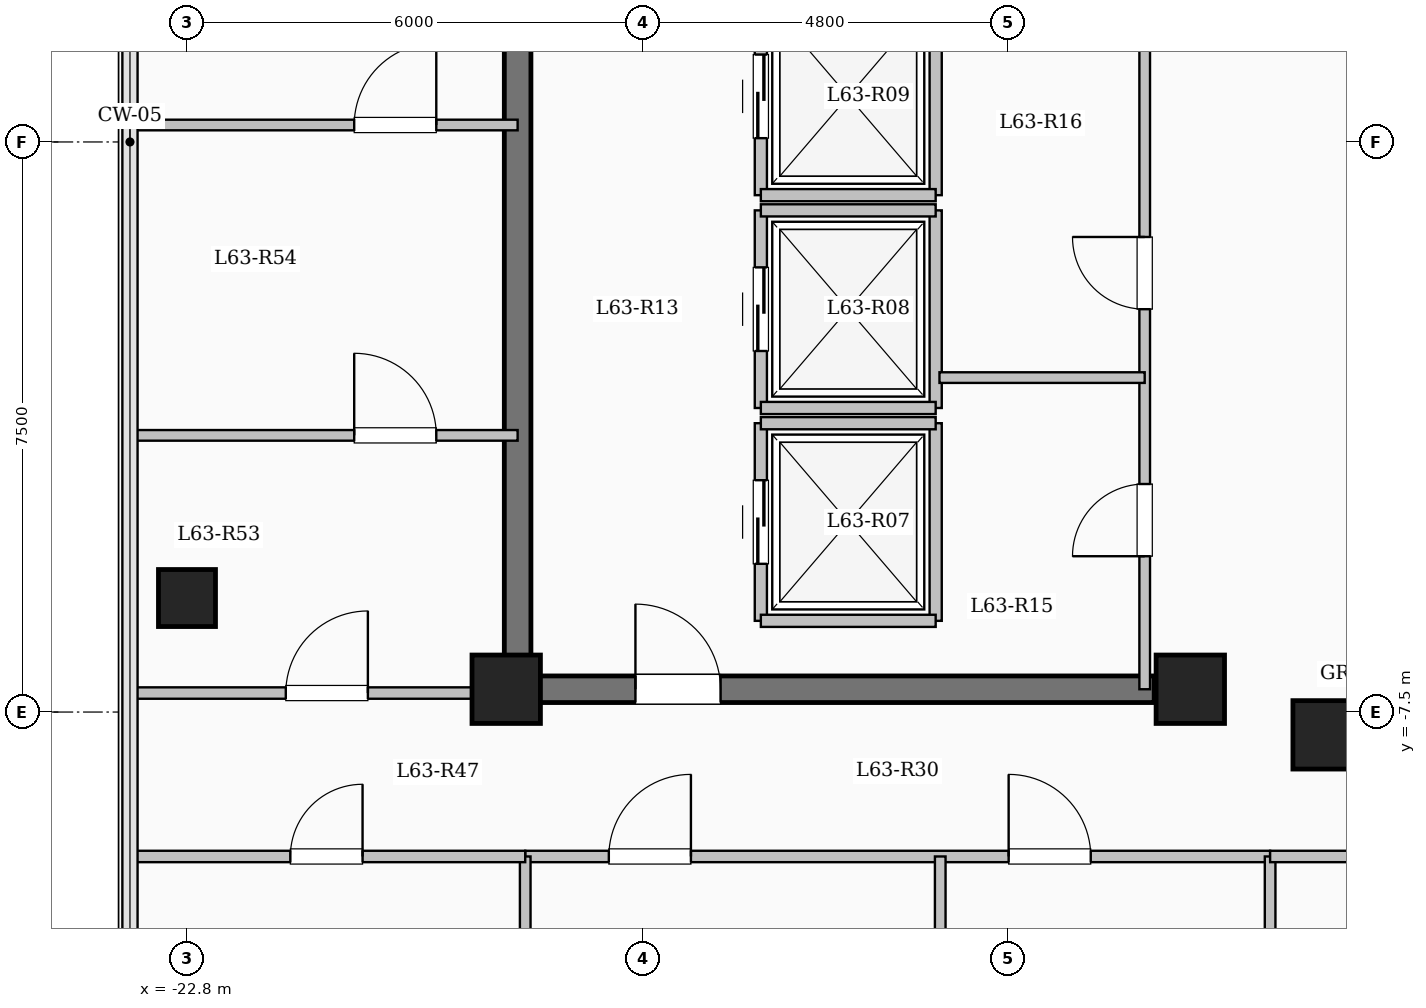
"""IFC4 building model, lengths in metres.
Left out: names, types, materials, properties, quantities, classifications, styles, units other than length and angle.
Written with IfcOpenShell. Run it as: python <this file> out.ifc"""

import sys

from ifc_helpers import new_model, si_unit, direction, frame, frame_2d, origin, origin_2d, place, context, subcontext, project, spatial, rectangle, extrude, element, fill, save


model = new_model("IFC4")
c1 = context("Model", 3, precision=1e-05, world=origin(), true_north=direction((0.0, 1.0)))
c2 = subcontext(c1, "Body", "Model", "MODEL_VIEW")
j1 = project(units=[si_unit("LENGTHUNIT", "METRE"), si_unit("PLANEANGLEUNIT", "RADIAN")], contexts=[c1])
p1 = place(None, origin())
s1 = spatial("IfcSite", under=j1, at=p1, CompositionType="ELEMENT")
p2 = place(p1, origin())
s2 = spatial("IfcBuilding", under=s1, at=p2, CompositionType="ELEMENT")
p3 = place(p2, frame((0.0, 0.0, 231.75)))
s3 = spatial("IfcBuildingStorey", under=s2, at=p3, CompositionType="ELEMENT", Elevation=231.75)
for number, where, z_axis, x_axis in (
    (1, (-7.8, -7.8, 0.0), (0.0, 0.0, 1.0), (1.0, 0.0, 0.0)),
    (2, (-9.6, -7.2, 0.0), (0.0, 0.0, 1.0), (1.0, 0.0, 0.0)),
    (3, (-18.6, -7.2, 0.0), (0.0, 0.0, 1.0), (1.0, 0.0, 0.0)),
):
    element("IfcColumn", number, at=place(p3, frame(where, z_axis=z_axis, x_axis=x_axis)), inside=s3, PredefinedType="COLUMN", context=c2, shape_type="SweptSolid", body=[
        extrude(rectangle(XDim=0.9, YDim=0.9, at=origin_2d()), origin(), (0.0, 0.0, 1.0), 4.65),
    ])
p4 = place(p3, frame((-22.8, -6.0, 0.0), z_axis=(0.0, 0.0, 1.0), x_axis=(1.0, 0.0, 0.0)))
e4 = element("IfcColumn", 4, at=p4, inside=s3, PredefinedType="COLUMN", context=c2, shape_type="SweptSolid", body=[
    extrude(rectangle(XDim=0.75, YDim=0.75, at=origin_2d()), origin(), (0.0, 0.0, 1.0), 4.65),
])
p5 = place(p3, frame((-15.25, -6.3, 0.0), z_axis=(0.0, 0.0, 1.0), x_axis=(0.0, 1.0, 0.0)))
e5 = element("IfcWall", 5, at=p5, inside=s3, PredefinedType="SOLIDWALL", context=c2, shape_type="SweptSolid", body=[
    extrude(rectangle(XDim=2.6, YDim=0.16, at=frame_2d((1.3, 0.0))), origin(), (0.0, 0.0, 1.0), 4.35),
])
p6 = place(p5, frame((0.75, 0.0, 0.0)))
e6 = element("IfcOpeningElement", 6, at=p6, cuts=e5, PredefinedType="OPENING", context=c2, shape_type="SweptSolid", body=[
    extrude(rectangle(XDim=1.1, YDim=2.15, at=frame_2d((0.55, 1.075))), frame((0.0, 0.09, 0.0), z_axis=(0.0, -1.0, 0.0), x_axis=(1.0, 0.0, 0.0)), (0.0, 0.0, 1.0), 0.18),
])
p7 = place(p3, frame((-12.95, -6.3, 0.0), z_axis=(0.0, 0.0, 1.0), x_axis=(0.0, 1.0, 0.0)))
e7 = element("IfcWall", 7, at=p7, inside=s3, PredefinedType="SOLIDWALL", context=c2, shape_type="SweptSolid", body=[
    extrude(rectangle(XDim=2.6, YDim=0.16, at=frame_2d((1.3, 0.0))), origin(), (0.0, 0.0, 1.0), 4.35),
])
for number, where, z_axis, x_axis in (
    (8, (-15.25, -6.3, 0.0), (0.0, 0.0, 1.0), (1.0, 0.0, 0.0)),
    (9, (-15.25, -3.7, 0.0), (0.0, 0.0, 1.0), (1.0, 0.0, 0.0)),
):
    element("IfcWall", number, at=place(p3, frame(where, z_axis=z_axis, x_axis=x_axis)), inside=s3, PredefinedType="SOLIDWALL", context=c2, shape_type="SweptSolid", body=[
        extrude(rectangle(XDim=2.3, YDim=0.16, at=frame_2d((1.15, 0.0))), origin(), (0.0, 0.0, 1.0), 4.35),
    ])
p8 = place(p3, frame((-15.25, -3.5, 0.0), z_axis=(0.0, 0.0, 1.0), x_axis=(0.0, 1.0, 0.0)))
e10 = element("IfcWall", 10, at=p8, inside=s3, PredefinedType="SOLIDWALL", context=c2, shape_type="SweptSolid", body=[
    extrude(rectangle(XDim=2.6, YDim=0.16, at=frame_2d((1.3, 0.0))), origin(), (0.0, 0.0, 1.0), 4.35),
])
p9 = place(p8, frame((0.75, 0.0, 0.0)))
e11 = element("IfcOpeningElement", 11, at=p9, cuts=e10, PredefinedType="OPENING", context=c2, shape_type="SweptSolid", body=[
    extrude(rectangle(XDim=1.1, YDim=2.15, at=frame_2d((0.55, 1.075))), frame((0.0, 0.09, 0.0), z_axis=(0.0, -1.0, 0.0), x_axis=(1.0, 0.0, 0.0)), (0.0, 0.0, 1.0), 0.18),
])
p10 = place(p3, frame((-12.95, -3.5, 0.0), z_axis=(0.0, 0.0, 1.0), x_axis=(0.0, 1.0, 0.0)))
e12 = element("IfcWall", 12, at=p10, inside=s3, PredefinedType="SOLIDWALL", context=c2, shape_type="SweptSolid", body=[
    extrude(rectangle(XDim=2.6, YDim=0.16, at=frame_2d((1.3, 0.0))), origin(), (0.0, 0.0, 1.0), 4.35),
])
for number, where, z_axis, x_axis in (
    (13, (-15.25, -3.5, 0.0), (0.0, 0.0, 1.0), (1.0, 0.0, 0.0)),
    (14, (-15.25, -0.9, 0.0), (0.0, 0.0, 1.0), (1.0, 0.0, 0.0)),
):
    element("IfcWall", number, at=place(p3, frame(where, z_axis=z_axis, x_axis=x_axis)), inside=s3, PredefinedType="SOLIDWALL", context=c2, shape_type="SweptSolid", body=[
        extrude(rectangle(XDim=2.3, YDim=0.16, at=frame_2d((1.15, 0.0))), origin(), (0.0, 0.0, 1.0), 4.35),
    ])
p11 = place(p3, frame((-15.25, -0.7, 0.0), z_axis=(0.0, 0.0, 1.0), x_axis=(0.0, 1.0, 0.0)))
e15 = element("IfcWall", 15, at=p11, inside=s3, PredefinedType="SOLIDWALL", context=c2, shape_type="SweptSolid", body=[
    extrude(rectangle(XDim=2.6, YDim=0.16, at=frame_2d((1.3, 0.0))), origin(), (0.0, 0.0, 1.0), 4.35),
])
p12 = place(p11, frame((0.75, 0.0, 0.0)))
e16 = element("IfcOpeningElement", 16, at=p12, cuts=e15, PredefinedType="OPENING", context=c2, shape_type="SweptSolid", body=[
    extrude(rectangle(XDim=1.1, YDim=2.15, at=frame_2d((0.55, 1.075))), frame((0.0, 0.09, 0.0), z_axis=(0.0, -1.0, 0.0), x_axis=(1.0, 0.0, 0.0)), (0.0, 0.0, 1.0), 0.18),
])
p13 = place(p3, frame((-12.95, -0.7, 0.0), z_axis=(0.0, 0.0, 1.0), x_axis=(0.0, 1.0, 0.0)))
e17 = element("IfcWall", 17, at=p13, inside=s3, PredefinedType="SOLIDWALL", context=c2, shape_type="SweptSolid", body=[
    extrude(rectangle(XDim=2.6, YDim=0.16, at=frame_2d((1.3, 0.0))), origin(), (0.0, 0.0, 1.0), 4.35),
])
p14 = place(p3, frame((-15.25, -0.7, 0.0), z_axis=(0.0, 0.0, 1.0), x_axis=(1.0, 0.0, 0.0)))
e18 = element("IfcWall", 18, at=p14, inside=s3, PredefinedType="SOLIDWALL", context=c2, shape_type="SweptSolid", body=[
    extrude(rectangle(XDim=2.3, YDim=0.16, at=frame_2d((1.15, 0.0))), origin(), (0.0, 0.0, 1.0), 4.35),
])
p15 = place(p3, frame((-18.45, -7.375, 0.0), z_axis=(0.0, 0.0, 1.0), x_axis=(0.0, 1.0, 0.0)))
e19 = element("IfcWall", 19, at=p15, inside=s3, PredefinedType="SHEAR", context=c2, shape_type="SweptSolid", body=[
    extrude(rectangle(XDim=14.05, YDim=0.35, at=frame_2d((7.025, 0.0))), origin(), (0.0, 0.0, 1.0), 4.65),
])
p16 = place(p3, frame((-18.625, -7.2, 0.0), z_axis=(0.0, 0.0, 1.0), x_axis=(1.0, 0.0, 0.0)))
e20 = element("IfcWall", 20, at=p16, inside=s3, PredefinedType="SHEAR", context=c2, shape_type="SweptSolid", body=[
    extrude(rectangle(XDim=8.55, YDim=0.35, at=frame_2d((4.275, 0.0))), origin(), (0.0, 0.0, 1.0), 4.65),
])
p17 = place(p16, frame((1.725, 0.0, 0.0)))
e21 = element("IfcOpeningElement", 21, at=p17, cuts=e20, PredefinedType="OPENING", context=c2, shape_type="SweptSolid", body=[
    extrude(rectangle(XDim=1.12, YDim=2.15, at=frame_2d((0.56, 1.075))), frame((0.0, 0.185, 0.0), z_axis=(0.0, -1.0, 0.0), x_axis=(1.0, 0.0, 0.0)), (0.0, 0.0, 1.0), 0.37),
])
p18 = place(p3, frame((-10.2, -7.2, 0.0), z_axis=(0.0, 0.0, 1.0), x_axis=(0.0, 1.0, 0.0)))
e22 = element("IfcWall", 22, at=p18, inside=s3, PredefinedType="PARTITIONING", context=c2, shape_type="SweptSolid", body=[
    extrude(rectangle(XDim=9.12, YDim=0.14, at=frame_2d((4.56, 0.0))), origin(), (0.0, 0.0, 1.0), 4.35),
])
p19 = place(p18, frame((1.75, 0.0, 0.0)))
e23 = element("IfcOpeningElement", 23, at=p19, cuts=e22, PredefinedType="OPENING", context=c2, shape_type="SweptSolid", body=[
    extrude(rectangle(XDim=0.95, YDim=2.12, at=frame_2d((0.475, 1.06))), frame((0.0, 0.08, 0.0), z_axis=(0.0, -1.0, 0.0), x_axis=(1.0, 0.0, 0.0)), (0.0, 0.0, 1.0), 0.16),
])
p20 = place(p18, frame((5.0, 0.0, 0.0)))
e24 = element("IfcOpeningElement", 24, at=p20, cuts=e22, PredefinedType="OPENING", context=c2, shape_type="SweptSolid", body=[
    extrude(rectangle(XDim=0.95, YDim=2.12, at=frame_2d((0.475, 1.06))), frame((0.0, 0.08, 0.0), z_axis=(0.0, -1.0, 0.0), x_axis=(1.0, 0.0, 0.0)), (0.0, 0.0, 1.0), 0.16),
])
p21 = place(p3, frame((-12.9, -3.1, 0.0), z_axis=(0.0, 0.0, 1.0), x_axis=(1.0, 0.0, 0.0)))
e25 = element("IfcWall", 25, at=p21, inside=s3, PredefinedType="PARTITIONING", context=c2, shape_type="SweptSolid", body=[
    extrude(rectangle(XDim=2.7, YDim=0.14, at=frame_2d((1.35, 0.0))), origin(), (0.0, 0.0, 1.0), 4.35),
])
p22 = place(p3, frame((-18.35, -9.4, 0.0), z_axis=(0.0, 0.0, 1.0), x_axis=(1.0, 0.0, 0.0)))
e26 = element("IfcWall", 26, at=p22, inside=s3, PredefinedType="PARTITIONING", context=c2, shape_type="SweptSolid", body=[
    extrude(rectangle(XDim=9.8, YDim=0.15, at=frame_2d((4.9, 0.0))), origin(), (0.0, 0.0, 1.0), 4.35),
])
p23 = place(p22, frame((1.1, 0.0, 0.0)))
e27 = element("IfcOpeningElement", 27, at=p23, cuts=e26, PredefinedType="OPENING", context=c2, shape_type="SweptSolid", body=[
    extrude(rectangle(XDim=1.08, YDim=2.15, at=frame_2d((0.54, 1.075))), frame((0.0, 0.085, 0.0), z_axis=(0.0, -1.0, 0.0), x_axis=(1.0, 0.0, 0.0)), (0.0, 0.0, 1.0), 0.17),
])
p24 = place(p22, frame((6.36, 0.0, 0.0)))
e28 = element("IfcOpeningElement", 28, at=p24, cuts=e26, PredefinedType="OPENING", context=c2, shape_type="SweptSolid", body=[
    extrude(rectangle(XDim=1.08, YDim=2.15, at=frame_2d((0.54, 1.075))), frame((0.0, 0.085, 0.0), z_axis=(0.0, -1.0, 0.0), x_axis=(1.0, 0.0, 0.0)), (0.0, 0.0, 1.0), 0.17),
])
p25 = place(p3, frame((-12.89, -20.9, 0.0), z_axis=(0.0, 0.0, 1.0), x_axis=(0.0, 1.0, 0.0)))
e29 = element("IfcWall", 29, at=p25, inside=s3, PredefinedType="PARTITIONING", context=c2, shape_type="SweptSolid", body=[
    extrude(rectangle(XDim=11.5, YDim=0.14, at=frame_2d((5.75, 0.0))), origin(), (0.0, 0.0, 1.0), 4.35),
])
p26 = place(p3, frame((-8.55, -21.504, 0.0), z_axis=(0.0, 0.0, 1.0), x_axis=(0.0, 1.0, 0.0)))
e30 = element("IfcWall", 30, at=p26, inside=s3, PredefinedType="PARTITIONING", context=c2, shape_type="SweptSolid", body=[
    extrude(rectangle(XDim=12.104, YDim=0.14, at=frame_2d((6.052, 0.0))), origin(), (0.0, 0.0, 1.0), 4.35),
])
p27 = place(p3, frame((-8.55, -9.4, 0.0), z_axis=(0.0, 0.0, 1.0), x_axis=(1.0, 0.0, 0.0)))
e31 = element("IfcWall", 31, at=p27, inside=s3, PredefinedType="PARTITIONING", context=c2, shape_type="SweptSolid", body=[
    extrude(rectangle(XDim=17.1, YDim=0.15, at=frame_2d((8.55, 0.0))), origin(), (0.0, 0.0, 1.0), 4.35),
])
p28 = place(p27, frame((1.85, 0.0, 0.0)))
e32 = element("IfcOpeningElement", 32, at=p28, cuts=e31, PredefinedType="OPENING", context=c2, shape_type="SweptSolid", body=[
    extrude(rectangle(XDim=1.08, YDim=2.15, at=frame_2d((0.54, 1.075))), frame((0.0, 0.085, 0.0), z_axis=(0.0, -1.0, 0.0), x_axis=(1.0, 0.0, 0.0)), (0.0, 0.0, 1.0), 0.17),
])
p29 = place(p27, frame((10.5, 0.0, 0.0)))
e33 = element("IfcOpeningElement", 33, at=p29, cuts=e31, PredefinedType="OPENING", context=c2, shape_type="SweptSolid", body=[
    extrude(rectangle(XDim=1.08, YDim=2.15, at=frame_2d((0.54, 1.075))), frame((0.0, 0.085, 0.0), z_axis=(0.0, -1.0, 0.0), x_axis=(1.0, 0.0, 0.0)), (0.0, 0.0, 1.0), 0.17),
])
p30 = place(p3, frame((-23.58, -7.25, 0.0), z_axis=(0.0, 0.0, 1.0), x_axis=(1.0, 0.0, 0.0)))
e34 = element("IfcWall", 34, at=p30, inside=s3, PredefinedType="PARTITIONING", context=c2, shape_type="SweptSolid", body=[
    extrude(rectangle(XDim=5.13, YDim=0.15, at=frame_2d((2.565, 0.0))), origin(), (0.0, 0.0, 1.0), 4.35),
])
p31 = place(p30, frame((2.08, 0.0, 0.0)))
e35 = element("IfcOpeningElement", 35, at=p31, cuts=e34, PredefinedType="OPENING", context=c2, shape_type="SweptSolid", body=[
    extrude(rectangle(XDim=1.08, YDim=2.15, at=frame_2d((0.54, 1.075))), frame((0.0, 0.085, 0.0), z_axis=(0.0, -1.0, 0.0), x_axis=(1.0, 0.0, 0.0)), (0.0, 0.0, 1.0), 0.17),
])
p32 = place(p3, frame((-18.35, -17.25, 0.0), z_axis=(0.0, 0.0, 1.0), x_axis=(0.0, 1.0, 0.0)))
e36 = element("IfcWall", 36, at=p32, inside=s3, PredefinedType="PARTITIONING", context=c2, shape_type="SweptSolid", body=[
    extrude(rectangle(XDim=7.85, YDim=0.14, at=frame_2d((3.925, 0.0))), origin(), (0.0, 0.0, 1.0), 4.35),
])
p33 = place(p3, frame((-23.58, -9.4, 0.0), z_axis=(0.0, 0.0, 1.0), x_axis=(1.0, 0.0, 0.0)))
e37 = element("IfcWall", 37, at=p33, inside=s3, PredefinedType="PARTITIONING", context=c2, shape_type="SweptSolid", body=[
    extrude(rectangle(XDim=5.23, YDim=0.15, at=frame_2d((2.615, 0.0))), origin(), (0.0, 0.0, 1.0), 4.35),
])
p34 = place(p33, frame((2.14, 0.0, 0.0)))
e38 = element("IfcOpeningElement", 38, at=p34, cuts=e37, PredefinedType="OPENING", context=c2, shape_type="SweptSolid", body=[
    extrude(rectangle(XDim=0.95, YDim=2.15, at=frame_2d((0.475, 1.075))), frame((0.0, 0.085, 0.0), z_axis=(0.0, -1.0, 0.0), x_axis=(1.0, 0.0, 0.0)), (0.0, 0.0, 1.0), 0.17),
])
p35 = place(p3, frame((-23.58, -3.86, 0.0), z_axis=(0.0, 0.0, 1.0), x_axis=(1.0, 0.0, 0.0)))
e39 = element("IfcWall", 39, at=p35, inside=s3, PredefinedType="PARTITIONING", context=c2, shape_type="SweptSolid", body=[
    extrude(rectangle(XDim=5.13, YDim=0.14, at=frame_2d((2.565, 0.0))), origin(), (0.0, 0.0, 1.0), 4.35),
])
p36 = place(p35, frame((2.98, 0.0, 0.0)))
e40 = element("IfcOpeningElement", 40, at=p36, cuts=e39, PredefinedType="OPENING", context=c2, shape_type="SweptSolid", body=[
    extrude(rectangle(XDim=1.08, YDim=2.15, at=frame_2d((0.54, 1.075))), frame((0.0, 0.08, 0.0), z_axis=(0.0, -1.0, 0.0), x_axis=(1.0, 0.0, 0.0)), (0.0, 0.0, 1.0), 0.16),
])
p37 = place(p3, frame((-23.58, 0.223, 0.0), z_axis=(0.0, 0.0, 1.0), x_axis=(1.0, 0.0, 0.0)))
e41 = element("IfcWall", 41, at=p37, inside=s3, PredefinedType="PARTITIONING", context=c2, shape_type="SweptSolid", body=[
    extrude(rectangle(XDim=5.13, YDim=0.14, at=frame_2d((2.565, 0.0))), origin(), (0.0, 0.0, 1.0), 4.35),
])
p38 = place(p37, frame((2.98, 0.0, 0.0)))
e42 = element("IfcOpeningElement", 42, at=p38, cuts=e41, PredefinedType="OPENING", context=c2, shape_type="SweptSolid", body=[
    extrude(rectangle(XDim=1.08, YDim=2.15, at=frame_2d((0.54, 1.075))), frame((0.0, 0.08, 0.0), z_axis=(0.0, -1.0, 0.0), x_axis=(1.0, 0.0, 0.0)), (0.0, 0.0, 1.0), 0.16),
])
p39 = place(p6, origin())
e43 = element("IfcDoor", 43, at=p39, inside=s3, OperationType="SLIDING_TO_LEFT", PredefinedType="DOOR", context=c2, shape_type="SweptSolid", body=[
    extrude(rectangle(XDim=1.1, YDim=2.15, at=frame_2d((0.55, 1.075))), frame((0.0, 0.025, 0.0), z_axis=(0.0, -1.0, 0.0), x_axis=(1.0, 0.0, 0.0)), (0.0, 0.0, 1.0), 0.05),
])
fill(e6, e43)
p40 = place(p9, origin())
e44 = element("IfcDoor", 44, at=p40, inside=s3, OperationType="SLIDING_TO_LEFT", PredefinedType="DOOR", context=c2, shape_type="SweptSolid", body=[
    extrude(rectangle(XDim=1.1, YDim=2.15, at=frame_2d((0.55, 1.075))), frame((0.0, 0.025, 0.0), z_axis=(0.0, -1.0, 0.0), x_axis=(1.0, 0.0, 0.0)), (0.0, 0.0, 1.0), 0.05),
])
fill(e11, e44)
p41 = place(p12, origin())
e45 = element("IfcDoor", 45, at=p41, inside=s3, OperationType="SLIDING_TO_LEFT", PredefinedType="DOOR", context=c2, shape_type="SweptSolid", body=[
    extrude(rectangle(XDim=1.1, YDim=2.15, at=frame_2d((0.55, 1.075))), frame((0.0, 0.025, 0.0), z_axis=(0.0, -1.0, 0.0), x_axis=(1.0, 0.0, 0.0)), (0.0, 0.0, 1.0), 0.05),
])
fill(e16, e45)
p42 = place(p17, origin())
e46 = element("IfcDoor", 46, at=p42, inside=s3, OperationType="SINGLE_SWING_LEFT", PredefinedType="DOOR", context=c2, shape_type="SweptSolid", body=[
    extrude(rectangle(XDim=1.12, YDim=2.15, at=frame_2d((0.56, 1.075))), frame((0.0, 0.025, 0.0), z_axis=(0.0, -1.0, 0.0), x_axis=(1.0, 0.0, 0.0)), (0.0, 0.0, 1.0), 0.05),
])
fill(e21, e46)
p43 = place(p19, origin())
e47 = element("IfcDoor", 47, at=p43, inside=s3, OperationType="SINGLE_SWING_LEFT", PredefinedType="DOOR", context=c2, shape_type="SweptSolid", body=[
    extrude(rectangle(XDim=0.95, YDim=2.12, at=frame_2d((0.475, 1.06))), frame((0.0, 0.025, 0.0), z_axis=(0.0, -1.0, 0.0), x_axis=(1.0, 0.0, 0.0)), (0.0, 0.0, 1.0), 0.05),
])
fill(e23, e47)
p44 = place(p20, origin())
e48 = element("IfcDoor", 48, at=p44, inside=s3, OperationType="SINGLE_SWING_RIGHT", PredefinedType="DOOR", context=c2, shape_type="SweptSolid", body=[
    extrude(rectangle(XDim=0.95, YDim=2.12, at=frame_2d((0.475, 1.06))), frame((0.0, 0.025, 0.0), z_axis=(0.0, -1.0, 0.0), x_axis=(1.0, 0.0, 0.0)), (0.0, 0.0, 1.0), 0.05),
])
fill(e24, e48)
p45 = place(p23, origin())
e49 = element("IfcDoor", 49, at=p45, inside=s3, OperationType="SINGLE_SWING_RIGHT", PredefinedType="DOOR", context=c2, shape_type="SweptSolid", body=[
    extrude(rectangle(XDim=1.08, YDim=2.15, at=frame_2d((0.54, 1.075))), frame((0.0, 0.025, 0.0), z_axis=(0.0, -1.0, 0.0), x_axis=(1.0, 0.0, 0.0)), (0.0, 0.0, 1.0), 0.05),
])
fill(e27, e49)
p46 = place(p24, origin())
e50 = element("IfcDoor", 50, at=p46, inside=s3, OperationType="SINGLE_SWING_LEFT", PredefinedType="DOOR", context=c2, shape_type="SweptSolid", body=[
    extrude(rectangle(XDim=1.08, YDim=2.15, at=frame_2d((0.54, 1.075))), frame((0.0, 0.025, 0.0), z_axis=(0.0, -1.0, 0.0), x_axis=(1.0, 0.0, 0.0)), (0.0, 0.0, 1.0), 0.05),
])
fill(e28, e50)
p47 = place(p34, origin())
e51 = element("IfcDoor", 51, at=p47, inside=s3, OperationType="SINGLE_SWING_RIGHT", PredefinedType="DOOR", context=c2, shape_type="SweptSolid", body=[
    extrude(rectangle(XDim=0.95, YDim=2.15, at=frame_2d((0.475, 1.075))), frame((0.0, 0.025, 0.0), z_axis=(0.0, -1.0, 0.0), x_axis=(1.0, 0.0, 0.0)), (0.0, 0.0, 1.0), 0.05),
])
fill(e38, e51)
p48 = place(p31, origin())
e52 = element("IfcDoor", 52, at=p48, inside=s3, OperationType="SINGLE_SWING_RIGHT", PredefinedType="DOOR", context=c2, shape_type="SweptSolid", body=[
    extrude(rectangle(XDim=1.08, YDim=2.15, at=frame_2d((0.54, 1.075))), frame((0.0, 0.025, 0.0), z_axis=(0.0, -1.0, 0.0), x_axis=(1.0, 0.0, 0.0)), (0.0, 0.0, 1.0), 0.05),
])
fill(e35, e52)
p49 = place(p36, origin())
e53 = element("IfcDoor", 53, at=p49, inside=s3, OperationType="SINGLE_SWING_LEFT", PredefinedType="DOOR", context=c2, shape_type="SweptSolid", body=[
    extrude(rectangle(XDim=1.08, YDim=2.15, at=frame_2d((0.54, 1.075))), frame((0.0, 0.025, 0.0), z_axis=(0.0, -1.0, 0.0), x_axis=(1.0, 0.0, 0.0)), (0.0, 0.0, 1.0), 0.05),
])
fill(e40, e53)
p50 = place(p38, origin())
e54 = element("IfcDoor", 54, at=p50, inside=s3, OperationType="SINGLE_SWING_RIGHT", PredefinedType="DOOR", context=c2, shape_type="SweptSolid", body=[
    extrude(rectangle(XDim=1.08, YDim=2.15, at=frame_2d((0.54, 1.075))), frame((0.0, 0.025, 0.0), z_axis=(0.0, -1.0, 0.0), x_axis=(1.0, 0.0, 0.0)), (0.0, 0.0, 1.0), 0.05),
])
fill(e42, e54)
save(model, sys.argv[1])
